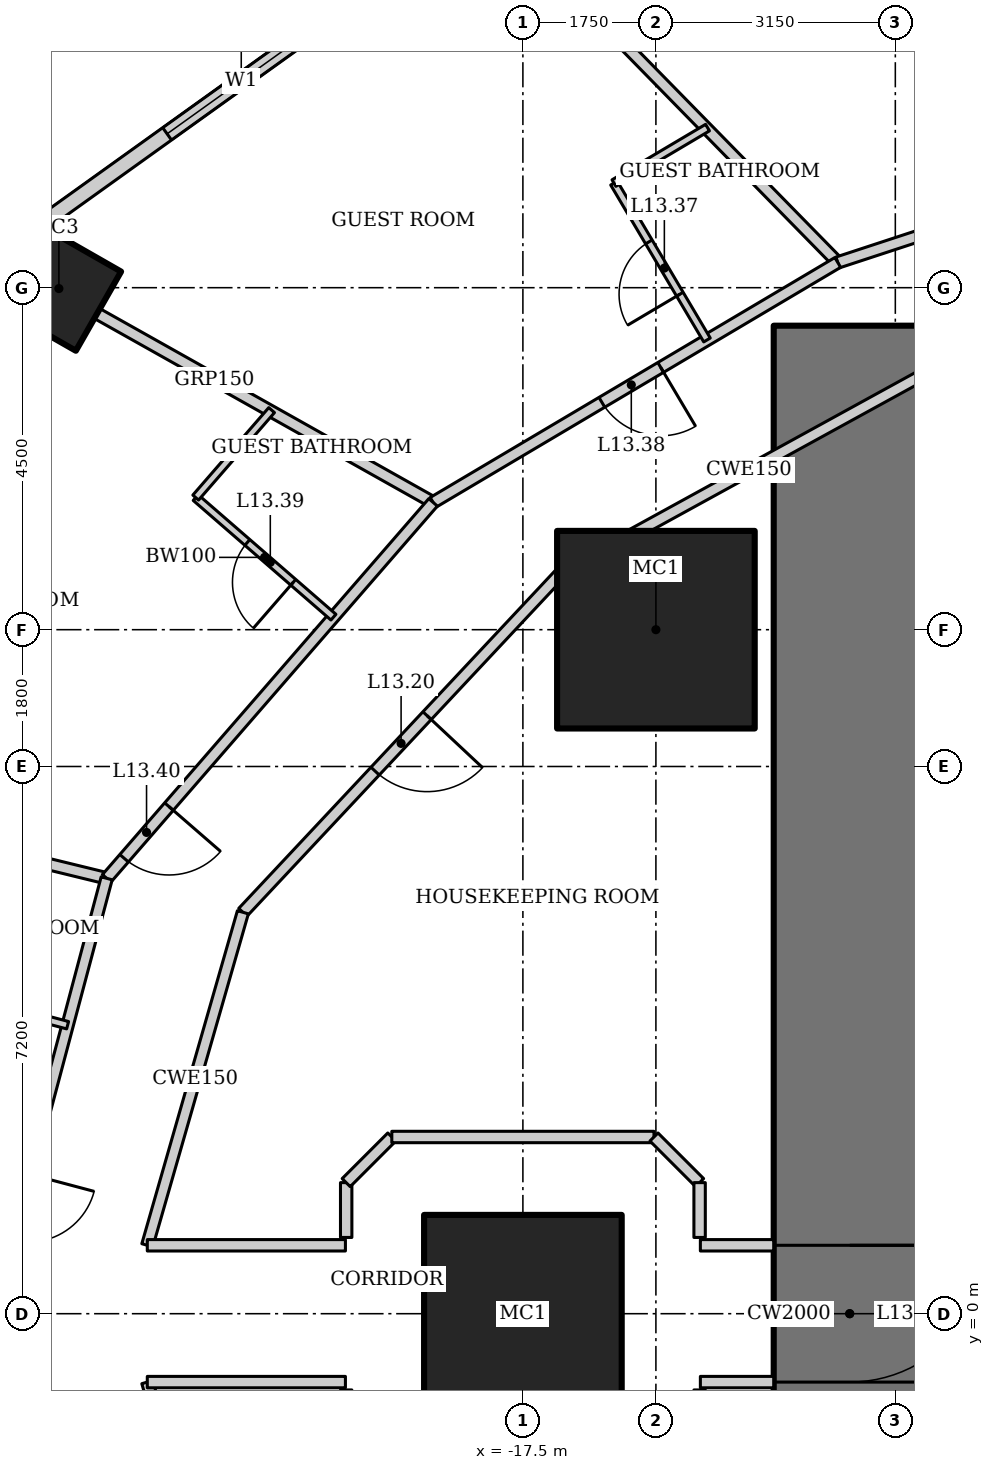
"""IFC4 building model, lengths in metres.
Left out: names, types, materials, properties, quantities, classifications, styles, units other than length and angle.
Written with IfcOpenShell. Run it as: python <this file> out.ifc"""

import sys

from ifc_helpers import new_model, si_unit, direction, frame, frame_2d, origin, origin_2d, place, context, subcontext, project, spatial, rectangle, hollow_rectangle, extrude, element, fill, save


model = new_model("IFC4")
c1 = context("Model", 3, precision=1e-05, world=origin(), true_north=direction((0.0, 1.0)))
c2 = subcontext(c1, "Body", "Model", "MODEL_VIEW")
j1 = project(units=[si_unit("LENGTHUNIT", "METRE"), si_unit("PLANEANGLEUNIT", "RADIAN")], contexts=[c1])
p1 = place(None, origin())
s1 = spatial("IfcSite", under=j1, at=p1, CompositionType="ELEMENT")
p2 = place(p1, origin())
s2 = spatial("IfcBuilding", under=s1, at=p2, CompositionType="ELEMENT")
p3 = place(p2, frame((0.0, 0.0, 62.2)))
s3 = spatial("IfcBuildingStorey", under=s2, at=p3, CompositionType="ELEMENT", Elevation=62.2)
for number, where, z_axis, x_axis in (
    (1, (-15.75, 9.0, 0.0), (0.0, 0.0, 1.0), (1.0, 0.0, 0.0)),
    (2, (-17.5, 0.0, 0.0), (0.0, 0.0, 1.0), (1.0, 0.0, 0.0)),
):
    element("IfcColumn", number, at=place(p3, frame(where, z_axis=z_axis, x_axis=x_axis)), inside=s3, PredefinedType="COLUMN", context=c2, shape_type="SweptSolid", body=[
        extrude(hollow_rectangle(XDim=2.6, YDim=2.6, WallThickness=0.13, at=origin_2d()), origin(), (0.0, 0.0, 1.0), 3.6),
    ])
p4 = place(p3, frame((-23.605, 13.489, 0.0), z_axis=(0.0, 0.0, 1.0), x_axis=(0.496139221777, 0.86824298017, 0.0)))
e3 = element("IfcColumn", 3, at=p4, inside=s3, PredefinedType="COLUMN", context=c2, shape_type="SweptSolid", body=[
    extrude(hollow_rectangle(XDim=1.2, YDim=1.2, WallThickness=0.12, at=origin_2d()), origin(), (0.0, 0.0, 1.0), 3.6),
])
p5 = place(p3, frame((-13.2, 13.0, 0.0), z_axis=(0.0, 0.0, 1.0), x_axis=(0.0, -1.0, 0.0)))
e4 = element("IfcWall", 4, at=p5, inside=s3, PredefinedType="SHEAR", context=c2, shape_type="SweptSolid", body=[
    extrude(rectangle(XDim=26.0, YDim=2.0, at=frame_2d((13.0, 0.0))), origin(), (0.0, 0.0, 1.0), 3.6),
])
p6 = place(p5, frame((12.1, 0.0, 0.0)))
e5 = element("IfcOpeningElement", 5, at=p6, cuts=e4, PredefinedType="OPENING", context=c2, shape_type="SweptSolid", body=[
    extrude(rectangle(XDim=1.8, YDim=2.1, at=frame_2d((0.9, 1.05))), frame((0.0, 1.01, 0.0), z_axis=(0.0, -1.0, 0.0), x_axis=(1.0, 0.0, 0.0)), (0.0, 0.0, 1.0), 2.02),
])
p7 = place(p3, frame((-17.929, 18.572, 0.0), z_axis=(0.0, 0.0, 1.0), x_axis=(-0.812791321576, -0.582554948112, 0.0)))
e6 = element("IfcWall", 6, at=p7, inside=s3, PredefinedType="SOLIDWALL", context=c2, shape_type="SweptSolid", body=[
    extrude(rectangle(XDim=8.063, YDim=0.2, at=frame_2d((4.032, 0.0))), origin(), (0.0, 0.0, 1.0), 3.45),
])
p8 = place(p7, frame((2.832, 0.0, 0.5)))
e7 = element("IfcOpeningElement", 7, at=p8, cuts=e6, PredefinedType="OPENING", context=c2, shape_type="SweptSolid", body=[
    extrude(rectangle(XDim=2.4, YDim=2.2, at=frame_2d((1.2, 1.1))), frame((0.0, 0.11, 0.0), z_axis=(0.0, -1.0, 0.0), x_axis=(1.0, 0.0, 0.0)), (0.0, 0.0, 1.0), 0.22),
])
p9 = place(p3, frame((-17.97, 18.542, 0.0), z_axis=(0.0, 0.0, 1.0), x_axis=(0.699736251994, -0.714401272147, 0.0)))
e8 = element("IfcWall", 8, at=p9, inside=s3, PredefinedType="PARTITIONING", context=c2, shape_type="SweptSolid", body=[
    extrude(rectangle(XDim=6.593, YDim=0.15, at=frame_2d((3.296, 0.0))), origin(), (0.0, 0.0, 1.0), 2.528),
])
p10 = place(p3, frame((-24.435, 13.909, 0.0), z_axis=(0.0, 0.0, 1.0), x_axis=(0.871747379892, -0.489955616001, 0.0)))
e9 = element("IfcWall", 9, at=p10, inside=s3, PredefinedType="PARTITIONING", context=c2, shape_type="SweptSolid", body=[
    extrude(rectangle(XDim=6.6, YDim=0.15, at=frame_2d((3.3, 0.0))), origin(), (0.0, 0.0, 1.0), 2.693),
])
p11 = place(p3, frame((-29.222, 7.254, 0.0), z_axis=(0.0, 0.0, 1.0), x_axis=(0.971456980633, -0.237215797913, 0.0)))
e10 = element("IfcWall", 10, at=p11, inside=s3, PredefinedType="PARTITIONING", context=c2, shape_type="SweptSolid", body=[
    extrude(rectangle(XDim=6.429, YDim=0.15, at=frame_2d((3.215, 0.0))), origin(), (0.0, 0.0, 1.0), 2.333),
])
p12 = place(p3, frame((-7.952, 15.607, 0.0), z_axis=(0.0, 0.0, 1.0), x_axis=(-0.950106803111, -0.311924770869, 0.0)))
e11 = element("IfcWall", 11, at=p12, inside=s3, PredefinedType="PARTITIONING", context=c2, shape_type="SweptSolid", body=[
    extrude(rectangle(XDim=5.689, YDim=0.15, at=frame_2d((2.845, 0.0))), origin(), (0.0, 0.0, 1.0), 3.45),
])
p13 = place(p12, frame((2.1, 0.0, 0.0)))
e12 = element("IfcOpeningElement", 12, at=p13, cuts=e11, PredefinedType="OPENING", context=c2, shape_type="SweptSolid", body=[
    extrude(rectangle(XDim=0.9, YDim=2.1, at=frame_2d((0.45, 1.05))), frame((0.0, 0.085, 0.0), z_axis=(0.0, -1.0, 0.0), x_axis=(1.0, 0.0, 0.0)), (0.0, 0.0, 1.0), 0.17),
])
p14 = place(p3, frame((-13.357, 13.832, 0.0), z_axis=(0.0, 0.0, 1.0), x_axis=(-0.860147339762, -0.510045639036, 0.0)))
e13 = element("IfcWall", 13, at=p14, inside=s3, PredefinedType="PARTITIONING", context=c2, shape_type="SweptSolid", body=[
    extrude(rectangle(XDim=6.19, YDim=0.15, at=frame_2d((3.095, 0.0))), origin(), (0.0, 0.0, 1.0), 3.45),
])
p15 = place(p14, frame((2.708, 0.0, 0.0)))
e14 = element("IfcOpeningElement", 14, at=p15, cuts=e13, PredefinedType="OPENING", context=c2, shape_type="SweptSolid", body=[
    extrude(rectangle(XDim=0.9, YDim=2.1, at=frame_2d((0.45, 1.05))), frame((0.0, 0.085, 0.0), z_axis=(0.0, -1.0, 0.0), x_axis=(1.0, 0.0, 0.0)), (0.0, 0.0, 1.0), 0.17),
])
p16 = place(p3, frame((-18.681, 10.675, 0.0), z_axis=(0.0, 0.0, 1.0), x_axis=(-0.655599989166, -0.755108372491, 0.0)))
e15 = element("IfcWall", 15, at=p16, inside=s3, PredefinedType="PARTITIONING", context=c2, shape_type="SweptSolid", body=[
    extrude(rectangle(XDim=6.551, YDim=0.15, at=frame_2d((3.275, 0.0))), origin(), (0.0, 0.0, 1.0), 3.45),
])
p17 = place(p16, frame((5.301, 0.0, 0.0)))
e16 = element("IfcOpeningElement", 16, at=p17, cuts=e15, PredefinedType="OPENING", context=c2, shape_type="SweptSolid", body=[
    extrude(rectangle(XDim=0.9, YDim=2.1, at=frame_2d((0.45, 1.05))), frame((0.0, 0.085, 0.0), z_axis=(0.0, -1.0, 0.0), x_axis=(1.0, 0.0, 0.0)), (0.0, 0.0, 1.0), 0.17),
])
p18 = place(p3, frame((-22.976, 5.729, 0.0), z_axis=(0.0, 0.0, 1.0), x_axis=(-0.257083265334, -0.966389256296, 0.0)))
e17 = element("IfcWall", 17, at=p18, inside=s3, PredefinedType="PARTITIONING", context=c2, shape_type="SweptSolid", body=[
    extrude(rectangle(XDim=5.928, YDim=0.15, at=frame_2d((2.964, 0.0))), origin(), (0.0, 0.0, 1.0), 3.45),
])
p19 = place(p18, frame((4.023, 0.0, 0.0)))
e18 = element("IfcOpeningElement", 18, at=p19, cuts=e17, PredefinedType="OPENING", context=c2, shape_type="SweptSolid", body=[
    extrude(rectangle(XDim=0.9, YDim=2.1, at=frame_2d((0.45, 1.05))), frame((0.0, 0.085, 0.0), z_axis=(0.0, -1.0, 0.0), x_axis=(1.0, 0.0, 0.0)), (0.0, 0.0, 1.0), 0.17),
])
p20 = place(p3, frame((-24.5, 0.0, 0.0), z_axis=(0.0, 0.0, 1.0), x_axis=(0.257083265334, -0.966389256296, 0.0)))
e19 = element("IfcWall", 19, at=p20, inside=s3, PredefinedType="PARTITIONING", context=c2, shape_type="SweptSolid", body=[
    extrude(rectangle(XDim=5.928, YDim=0.15, at=frame_2d((2.964, 0.0))), origin(), (0.0, 0.0, 1.0), 3.45),
])
p21 = place(p20, frame((2.1, 0.0, 0.0)))
e20 = element("IfcOpeningElement", 20, at=p21, cuts=e19, PredefinedType="OPENING", context=c2, shape_type="SweptSolid", body=[
    extrude(rectangle(XDim=0.9, YDim=2.1, at=frame_2d((0.45, 1.05))), frame((0.0, 0.085, 0.0), z_axis=(0.0, -1.0, 0.0), x_axis=(1.0, 0.0, 0.0)), (0.0, 0.0, 1.0), 0.17),
])
p22 = place(p3, frame((-12.036, 12.464, 0.0), z_axis=(0.0, 0.0, 1.0), x_axis=(-0.876522084062, -0.481361647986, 0.0)))
e21 = element("IfcWall", 21, at=p22, inside=s3, PredefinedType="PARTITIONING", context=c2, shape_type="SweptSolid", body=[
    extrude(rectangle(XDim=5.687, YDim=0.15, at=frame_2d((2.844, 0.0))), origin(), (0.0, 0.0, 1.0), 3.45),
])
p23 = place(p3, frame((-17.021, 9.726, 0.0), z_axis=(0.0, 0.0, 1.0), x_axis=(-0.68365836236, -0.729802194828, 0.0)))
e22 = element("IfcWall", 22, at=p23, inside=s3, PredefinedType="PARTITIONING", context=c2, shape_type="SweptSolid", body=[
    extrude(rectangle(XDim=6.09, YDim=0.15, at=frame_2d((3.045, 0.0))), origin(), (0.0, 0.0, 1.0), 3.45),
])
p24 = place(p23, frame((2.545, 0.0, 0.0)))
e23 = element("IfcOpeningElement", 23, at=p24, cuts=e22, PredefinedType="OPENING", context=c2, shape_type="SweptSolid", body=[
    extrude(rectangle(XDim=1.0, YDim=2.1, at=frame_2d((0.5, 1.05))), frame((0.0, 0.085, 0.0), z_axis=(0.0, -1.0, 0.0), x_axis=(1.0, 0.0, 0.0)), (0.0, 0.0, 1.0), 0.17),
])
for number, where, z_axis, x_axis in (
    (24, (-21.184, 5.282, 0.0), (0.0, 0.0, 1.0), (-0.276, -0.961, 0.0)),
    (25, (-22.442, -0.9, 0.0), (0.0, 0.0, 1.0), (0.276, -0.961, 0.0)),
):
    element("IfcWall", number, at=place(p3, frame(where, z_axis=z_axis, x_axis=x_axis)), inside=s3, PredefinedType="PARTITIONING", context=c2, shape_type="SweptSolid", body=[
        extrude(rectangle(XDim=4.559, YDim=0.15, at=frame_2d((2.279, 0.0))), origin(), (0.0, 0.0, 1.0), 3.45),
    ])
p25 = place(p3, frame((-15.078, 12.812, 0.0), z_axis=(0.0, 0.0, 1.0), x_axis=(-0.510075642074, 0.860129548012, 0.0)))
e26 = element("IfcWall", 26, at=p25, inside=s3, PredefinedType="PARTITIONING", context=c2, shape_type="SweptSolid", body=[
    extrude(rectangle(XDim=2.4, YDim=0.1, at=frame_2d((1.2, 0.0))), origin(), (0.0, 0.0, 1.0), 3.45),
])
p26 = place(p25, frame((0.7, 0.0, 0.0)))
e27 = element("IfcOpeningElement", 27, at=p26, cuts=e26, PredefinedType="OPENING", context=c2, shape_type="SweptSolid", body=[
    extrude(rectangle(XDim=0.8, YDim=2.1, at=frame_2d((0.4, 1.05))), frame((0.0, 0.06, 0.0), z_axis=(0.0, -1.0, 0.0), x_axis=(1.0, 0.0, 0.0)), (0.0, 0.0, 1.0), 0.12),
])
p27 = place(p3, frame((-16.302, 14.876, 0.0), z_axis=(0.0, 0.0, 1.0), x_axis=(0.8601307696, 0.510073582131, 0.0)))
e28 = element("IfcWall", 28, at=p27, inside=s3, PredefinedType="PARTITIONING", context=c2, shape_type="SweptSolid", body=[
    extrude(rectangle(XDim=1.431, YDim=0.1, at=frame_2d((0.716, 0.0))), origin(), (0.0, 0.0, 1.0), 3.45),
])
p28 = place(p3, frame((-19.993, 9.165, 0.0), z_axis=(0.0, 0.0, 1.0), x_axis=(-0.755098052661, 0.655611875172, 0.0)))
e29 = element("IfcWall", 29, at=p28, inside=s3, PredefinedType="PARTITIONING", context=c2, shape_type="SweptSolid", body=[
    extrude(rectangle(XDim=2.4, YDim=0.1, at=frame_2d((1.2, 0.0))), origin(), (0.0, 0.0, 1.0), 3.45),
])
p29 = place(p28, frame((0.7, 0.0, 0.0)))
e30 = element("IfcOpeningElement", 30, at=p29, cuts=e29, PredefinedType="OPENING", context=c2, shape_type="SweptSolid", body=[
    extrude(rectangle(XDim=0.8, YDim=2.1, at=frame_2d((0.4, 1.05))), frame((0.0, 0.06, 0.0), z_axis=(0.0, -1.0, 0.0), x_axis=(1.0, 0.0, 0.0)), (0.0, 0.0, 1.0), 0.12),
])
p30 = place(p3, frame((-21.805, 10.738, 0.0), z_axis=(0.0, 0.0, 1.0), x_axis=(0.655528024617, 0.755170847518, 0.0)))
e31 = element("IfcWall", 31, at=p30, inside=s3, PredefinedType="PARTITIONING", context=c2, shape_type="SweptSolid", body=[
    extrude(rectangle(XDim=1.524, YDim=0.1, at=frame_2d((0.762, 0.0))), origin(), (0.0, 0.0, 1.0), 3.45),
])
p31 = place(p3, frame((-23.49, 3.796, 0.0), z_axis=(0.0, 0.0, 1.0), x_axis=(-0.96639514992, 0.257061109879, 0.0)))
e32 = element("IfcWall", 32, at=p31, inside=s3, PredefinedType="PARTITIONING", context=c2, shape_type="SweptSolid", body=[
    extrude(rectangle(XDim=2.4, YDim=0.1, at=frame_2d((1.2, 0.0))), origin(), (0.0, 0.0, 1.0), 3.45),
])
p32 = place(p31, frame((0.7, 0.0, 0.0)))
e33 = element("IfcOpeningElement", 33, at=p32, cuts=e32, PredefinedType="OPENING", context=c2, shape_type="SweptSolid", body=[
    extrude(rectangle(XDim=0.8, YDim=2.1, at=frame_2d((0.4, 1.05))), frame((0.0, 0.06, 0.0), z_axis=(0.0, -1.0, 0.0), x_axis=(1.0, 0.0, 0.0)), (0.0, 0.0, 1.0), 0.12),
])
p33 = place(p3, frame((-14.2, -0.9, 0.0), z_axis=(0.0, 0.0, 1.0), x_axis=(-1.0, 0.0, 0.0)))
e34 = element("IfcWall", 34, at=p33, inside=s3, PredefinedType="PARTITIONING", context=c2, shape_type="SweptSolid", body=[
    extrude(rectangle(XDim=0.965, YDim=0.15, at=frame_2d((0.482, 0.0))), origin(), (0.0, 0.0, 1.0), 3.45),
])
p34 = place(p3, frame((-19.835, -0.9, 0.0), z_axis=(0.0, 0.0, 1.0), x_axis=(-1.0, 0.0, 0.0)))
e35 = element("IfcWall", 35, at=p34, inside=s3, PredefinedType="PARTITIONING", context=c2, shape_type="SweptSolid", body=[
    extrude(rectangle(XDim=2.607, YDim=0.15, at=frame_2d((1.303, 0.0))), origin(), (0.0, 0.0, 1.0), 3.45),
])
p35 = place(p3, frame((-14.2, 0.9, 0.0), z_axis=(0.0, 0.0, 1.0), x_axis=(-1.0, 0.0, 0.0)))
e36 = element("IfcWall", 36, at=p35, inside=s3, PredefinedType="PARTITIONING", context=c2, shape_type="SweptSolid", body=[
    extrude(rectangle(XDim=0.965, YDim=0.15, at=frame_2d((0.482, 0.0))), origin(), (0.0, 0.0, 1.0), 3.45),
])
p36 = place(p3, frame((-19.835, 0.9, 0.0), z_axis=(0.0, 0.0, 1.0), x_axis=(-1.0, 0.0, 0.0)))
e37 = element("IfcWall", 37, at=p36, inside=s3, PredefinedType="PARTITIONING", context=c2, shape_type="SweptSolid", body=[
    extrude(rectangle(XDim=2.607, YDim=0.15, at=frame_2d((1.303, 0.0))), origin(), (0.0, 0.0, 1.0), 3.45),
])
p37 = place(p3, frame((-19.825, 1.003, 0.0), z_axis=(0.0, 0.0, 1.0), x_axis=(0.0, 1.0, 0.0)))
e38 = element("IfcWall", 38, at=p37, inside=s3, PredefinedType="PARTITIONING", context=c2, shape_type="SweptSolid", body=[
    extrude(rectangle(XDim=0.721, YDim=0.15, at=frame_2d((0.361, 0.0))), origin(), (0.0, 0.0, 1.0), 3.45),
])
p38 = place(p3, frame((-19.825, 1.725, 0.0), z_axis=(0.0, 0.0, 1.0), x_axis=(0.707106781187, 0.707106781187, 0.0)))
e39 = element("IfcWall", 39, at=p38, inside=s3, PredefinedType="PARTITIONING", context=c2, shape_type="SweptSolid", body=[
    extrude(rectangle(XDim=0.849, YDim=0.15, at=frame_2d((0.425, 0.0))), origin(), (0.0, 0.0, 1.0), 3.45),
])
p39 = place(p3, frame((-19.225, 2.325, 0.0), z_axis=(0.0, 0.0, 1.0), x_axis=(1.0, 0.0, 0.0)))
e40 = element("IfcWall", 40, at=p39, inside=s3, PredefinedType="PARTITIONING", context=c2, shape_type="SweptSolid", body=[
    extrude(rectangle(XDim=3.449, YDim=0.15, at=frame_2d((1.725, 0.0))), origin(), (0.0, 0.0, 1.0), 3.45),
])
p40 = place(p3, frame((-15.775, 2.325, 0.0), z_axis=(0.0, 0.0, 1.0), x_axis=(0.707106781187, -0.707106781187, 0.0)))
e41 = element("IfcWall", 41, at=p40, inside=s3, PredefinedType="PARTITIONING", context=c2, shape_type="SweptSolid", body=[
    extrude(rectangle(XDim=0.849, YDim=0.15, at=frame_2d((0.425, 0.0))), origin(), (0.0, 0.0, 1.0), 3.45),
])
p41 = place(p3, frame((-15.175, 1.725, 0.0), z_axis=(0.0, 0.0, 1.0), x_axis=(0.0, -1.0, 0.0)))
e42 = element("IfcWall", 42, at=p41, inside=s3, PredefinedType="PARTITIONING", context=c2, shape_type="SweptSolid", body=[
    extrude(rectangle(XDim=0.721, YDim=0.15, at=frame_2d((0.361, 0.0))), origin(), (0.0, 0.0, 1.0), 3.45),
])
p42 = place(p8, origin())
e43 = element("IfcWindow", 43, at=p42, inside=s3, PartitioningType="SINGLE_PANEL", PredefinedType="WINDOW", context=c2, shape_type="SweptSolid", body=[
    extrude(rectangle(XDim=2.4, YDim=2.2, at=frame_2d((1.2, 1.1))), frame((0.0, 0.03, 0.0), z_axis=(0.0, -1.0, 0.0), x_axis=(1.0, 0.0, 0.0)), (0.0, 0.0, 1.0), 0.06),
])
fill(e7, e43)
p43 = place(p6, origin())
e44 = element("IfcDoor", 44, at=p43, inside=s3, OperationType="DOUBLE_DOOR_DOUBLE_SWING", PredefinedType="DOOR", context=c2, shape_type="SweptSolid", body=[
    extrude(rectangle(XDim=1.8, YDim=2.1, at=frame_2d((0.9, 1.05))), frame((0.0, 0.025, 0.0), z_axis=(0.0, -1.0, 0.0), x_axis=(1.0, 0.0, 0.0)), (0.0, 0.0, 1.0), 0.05),
])
fill(e5, e44)
p44 = place(p24, origin())
e45 = element("IfcDoor", 45, at=p44, inside=s3, OperationType="SINGLE_SWING_LEFT", PredefinedType="DOOR", context=c2, shape_type="SweptSolid", body=[
    extrude(rectangle(XDim=1.0, YDim=2.1, at=frame_2d((0.5, 1.05))), frame((0.0, 0.025, 0.0), z_axis=(0.0, -1.0, 0.0), x_axis=(1.0, 0.0, 0.0)), (0.0, 0.0, 1.0), 0.05),
])
fill(e23, e45)
p45 = place(p26, origin())
e46 = element("IfcDoor", 46, at=p45, inside=s3, OperationType="SINGLE_SWING_LEFT", PredefinedType="DOOR", context=c2, shape_type="SweptSolid", body=[
    extrude(rectangle(XDim=0.8, YDim=2.1, at=frame_2d((0.4, 1.05))), frame((0.0, 0.025, 0.0), z_axis=(0.0, -1.0, 0.0), x_axis=(1.0, 0.0, 0.0)), (0.0, 0.0, 1.0), 0.05),
])
fill(e27, e46)
p46 = place(p15, origin())
e47 = element("IfcDoor", 47, at=p46, inside=s3, OperationType="SINGLE_SWING_LEFT", PredefinedType="DOOR", context=c2, shape_type="SweptSolid", body=[
    extrude(rectangle(XDim=0.9, YDim=2.1, at=frame_2d((0.45, 1.05))), frame((0.0, 0.025, 0.0), z_axis=(0.0, -1.0, 0.0), x_axis=(1.0, 0.0, 0.0)), (0.0, 0.0, 1.0), 0.05),
])
fill(e14, e47)
p47 = place(p29, origin())
e48 = element("IfcDoor", 48, at=p47, inside=s3, OperationType="SINGLE_SWING_LEFT", PredefinedType="DOOR", context=c2, shape_type="SweptSolid", body=[
    extrude(rectangle(XDim=0.8, YDim=2.1, at=frame_2d((0.4, 1.05))), frame((0.0, 0.025, 0.0), z_axis=(0.0, -1.0, 0.0), x_axis=(1.0, 0.0, 0.0)), (0.0, 0.0, 1.0), 0.05),
])
fill(e30, e48)
p48 = place(p17, origin())
e49 = element("IfcDoor", 49, at=p48, inside=s3, OperationType="SINGLE_SWING_LEFT", PredefinedType="DOOR", context=c2, shape_type="SweptSolid", body=[
    extrude(rectangle(XDim=0.9, YDim=2.1, at=frame_2d((0.45, 1.05))), frame((0.0, 0.025, 0.0), z_axis=(0.0, -1.0, 0.0), x_axis=(1.0, 0.0, 0.0)), (0.0, 0.0, 1.0), 0.05),
])
fill(e16, e49)
save(model, sys.argv[1])
